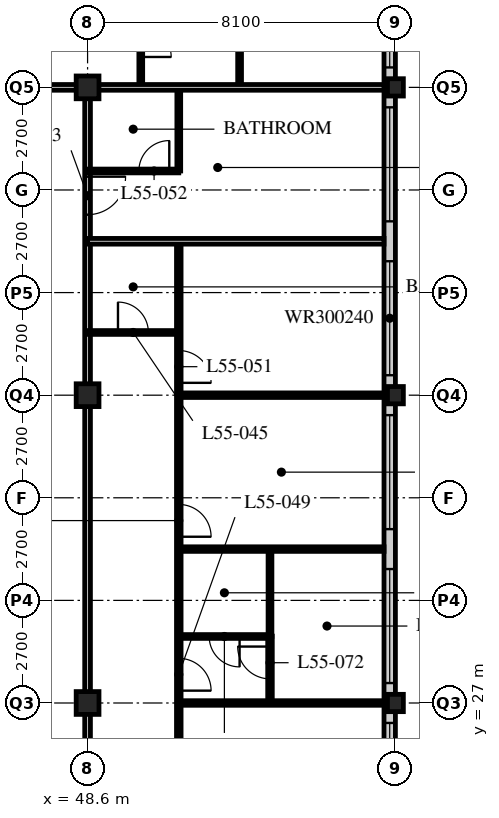
"""IFC4 building model, lengths in metres.
Left out: names, types, materials, properties, quantities, classifications, styles, units other than length and angle.
Written with IfcOpenShell. Run it as: python <this file> out.ifc"""

import sys

from ifc_helpers import new_model, si_unit, direction, frame, frame_2d, origin, origin_2d, place, context, subcontext, project, spatial, rectangle, hollow_rectangle, i_section, extrude, element, fill, save


model = new_model("IFC4")
c1 = context("Model", 3, precision=1e-05, world=origin(), true_north=direction((0.0, 1.0)))
c2 = subcontext(c1, "Body", "Model", "MODEL_VIEW")
j1 = project(units=[si_unit("LENGTHUNIT", "METRE"), si_unit("PLANEANGLEUNIT", "RADIAN")], contexts=[c1])
p1 = place(None, origin())
s1 = spatial("IfcSite", under=j1, at=p1, CompositionType="ELEMENT")
p2 = place(p1, origin())
s2 = spatial("IfcBuilding", under=s1, at=p2, CompositionType="ELEMENT")
p3 = place(p2, frame((0.0, 0.0, 213.6)))
s3 = spatial("IfcBuildingStorey", under=s2, at=p3, CompositionType="ELEMENT", Elevation=213.6)
for number, where, z_axis, x_axis in (
    (1, (48.6, 27.0, 0.0), (0.0, 0.0, 1.0), (1.0, 0.0, 0.0)),
    (2, (48.6, 35.1, 0.0), (0.0, 0.0, 1.0), (1.0, 0.0, 0.0)),
    (3, (48.6, 43.2, 0.0), (0.0, 0.0, 1.0), (1.0, 0.0, 0.0)),
):
    element("IfcColumn", number, at=place(p3, frame(where, z_axis=z_axis, x_axis=x_axis)), inside=s3, PredefinedType="COLUMN", context=c2, shape_type="SweptSolid", body=[
        extrude(hollow_rectangle(XDim=0.6, YDim=0.6, WallThickness=0.05, at=origin_2d()), origin(), (0.0, 0.0, 1.0), 3.6),
    ])
for number, where, z_axis, x_axis in (
    (4, (56.7, 27.0, 0.0), (0.0, 0.0, 1.0), (1.0, 0.0, 0.0)),
    (5, (56.7, 35.1, 0.0), (0.0, 0.0, 1.0), (1.0, 0.0, 0.0)),
    (6, (56.7, 43.2, 0.0), (0.0, 0.0, 1.0), (1.0, 0.0, 0.0)),
):
    element("IfcColumn", number, at=place(p3, frame(where, z_axis=z_axis, x_axis=x_axis)), inside=s3, PredefinedType="COLUMN", context=c2, shape_type="SweptSolid", body=[
        extrude(i_section(OverallWidth=0.418, OverallDepth=0.456, WebThickness=0.042, FlangeThickness=0.067, FilletRadius=0.015, at=origin_2d()), origin(), (0.0, 0.0, 1.0), 3.6),
    ])
p4 = place(p3, frame((56.55, 19.2, 0.0), z_axis=(0.0, 0.0, 1.0), x_axis=(0.0, 1.0, 0.0)))
e7 = element("IfcWall", 7, at=p4, inside=s3, PredefinedType="SOLIDWALL", context=c2, shape_type="SweptSolid", body=[
    extrude(rectangle(XDim=32.1, YDim=0.3, at=frame_2d((16.05, 0.0))), origin(), (0.0, 0.0, 1.0), 3.39),
])
p5 = place(p4, frame((0.225, 0.0, 0.6)))
e8 = element("IfcOpeningElement", 8, at=p5, cuts=e7, PredefinedType="OPENING", context=c2, shape_type="SweptSolid", body=[
    extrude(rectangle(XDim=3.0, YDim=2.4, at=frame_2d((1.5, 1.2))), frame((0.0, 0.16, 0.0), z_axis=(0.0, -1.0, 0.0), x_axis=(1.0, 0.0, 0.0)), (0.0, 0.0, 1.0), 0.32),
])
p6 = place(p4, frame((4.275, 0.0, 0.6)))
e9 = element("IfcOpeningElement", 9, at=p6, cuts=e7, PredefinedType="OPENING", context=c2, shape_type="SweptSolid", body=[
    extrude(rectangle(XDim=3.0, YDim=2.4, at=frame_2d((1.5, 1.2))), frame((0.0, 0.16, 0.0), z_axis=(0.0, -1.0, 0.0), x_axis=(1.0, 0.0, 0.0)), (0.0, 0.0, 1.0), 0.32),
])
p7 = place(p4, frame((8.325, 0.0, 0.6)))
e10 = element("IfcOpeningElement", 10, at=p7, cuts=e7, PredefinedType="OPENING", context=c2, shape_type="SweptSolid", body=[
    extrude(rectangle(XDim=3.0, YDim=2.4, at=frame_2d((1.5, 1.2))), frame((0.0, 0.16, 0.0), z_axis=(0.0, -1.0, 0.0), x_axis=(1.0, 0.0, 0.0)), (0.0, 0.0, 1.0), 0.32),
])
p8 = place(p4, frame((12.375, 0.0, 0.6)))
e11 = element("IfcOpeningElement", 11, at=p8, cuts=e7, PredefinedType="OPENING", context=c2, shape_type="SweptSolid", body=[
    extrude(rectangle(XDim=3.0, YDim=2.4, at=frame_2d((1.5, 1.2))), frame((0.0, 0.16, 0.0), z_axis=(0.0, -1.0, 0.0), x_axis=(1.0, 0.0, 0.0)), (0.0, 0.0, 1.0), 0.32),
])
p9 = place(p4, frame((16.425, 0.0, 0.6)))
e12 = element("IfcOpeningElement", 12, at=p9, cuts=e7, PredefinedType="OPENING", context=c2, shape_type="SweptSolid", body=[
    extrude(rectangle(XDim=3.0, YDim=2.4, at=frame_2d((1.5, 1.2))), frame((0.0, 0.16, 0.0), z_axis=(0.0, -1.0, 0.0), x_axis=(1.0, 0.0, 0.0)), (0.0, 0.0, 1.0), 0.32),
])
p10 = place(p4, frame((20.475, 0.0, 0.6)))
e13 = element("IfcOpeningElement", 13, at=p10, cuts=e7, PredefinedType="OPENING", context=c2, shape_type="SweptSolid", body=[
    extrude(rectangle(XDim=3.0, YDim=2.4, at=frame_2d((1.5, 1.2))), frame((0.0, 0.16, 0.0), z_axis=(0.0, -1.0, 0.0), x_axis=(1.0, 0.0, 0.0)), (0.0, 0.0, 1.0), 0.32),
])
p11 = place(p4, frame((24.525, 0.0, 0.6)))
e14 = element("IfcOpeningElement", 14, at=p11, cuts=e7, PredefinedType="OPENING", context=c2, shape_type="SweptSolid", body=[
    extrude(rectangle(XDim=3.0, YDim=2.4, at=frame_2d((1.5, 1.2))), frame((0.0, 0.16, 0.0), z_axis=(0.0, -1.0, 0.0), x_axis=(1.0, 0.0, 0.0)), (0.0, 0.0, 1.0), 0.32),
])
p12 = place(p4, frame((28.575, 0.0, 0.6)))
e15 = element("IfcOpeningElement", 15, at=p12, cuts=e7, PredefinedType="OPENING", context=c2, shape_type="SweptSolid", body=[
    extrude(rectangle(XDim=3.0, YDim=2.4, at=frame_2d((1.5, 1.2))), frame((0.0, 0.16, 0.0), z_axis=(0.0, -1.0, 0.0), x_axis=(1.0, 0.0, 0.0)), (0.0, 0.0, 1.0), 0.32),
])
p13 = place(p3, frame((12.15, 43.2, 0.0), z_axis=(0.0, 0.0, 1.0), x_axis=(1.0, 0.0, 0.0)))
e16 = element("IfcWall", 16, at=p13, inside=s3, PredefinedType="PARTITIONING", context=c2, shape_type="SweptSolid", body=[
    extrude(rectangle(XDim=36.45, YDim=0.15, at=frame_2d((18.225, 0.0))), origin(), (0.0, 0.0, 1.0), 2.778),
])
p14 = place(p13, frame((4.95, 0.0, 0.0)))
e17 = element("IfcOpeningElement", 17, at=p14, cuts=e16, PredefinedType="OPENING", context=c2, shape_type="SweptSolid", body=[
    extrude(rectangle(XDim=1.0, YDim=2.1, at=frame_2d((0.5, 1.05))), frame((0.0, 0.085, 0.0), z_axis=(0.0, -1.0, 0.0), x_axis=(1.0, 0.0, 0.0)), (0.0, 0.0, 1.0), 0.17),
])
p15 = place(p13, frame((25.0, 0.0, 0.0)))
e18 = element("IfcOpeningElement", 18, at=p15, cuts=e16, PredefinedType="OPENING", context=c2, shape_type="SweptSolid", body=[
    extrude(rectangle(XDim=1.0, YDim=2.1, at=frame_2d((0.5, 1.05))), frame((0.0, 0.085, 0.0), z_axis=(0.0, -1.0, 0.0), x_axis=(1.0, 0.0, 0.0)), (0.0, 0.0, 1.0), 0.17),
])
p16 = place(p13, frame((30.7, 0.0, 0.0)))
e19 = element("IfcOpeningElement", 19, at=p16, cuts=e16, PredefinedType="OPENING", context=c2, shape_type="SweptSolid", body=[
    extrude(rectangle(XDim=1.0, YDim=2.1, at=frame_2d((0.5, 1.05))), frame((0.0, 0.085, 0.0), z_axis=(0.0, -1.0, 0.0), x_axis=(1.0, 0.0, 0.0)), (0.0, 0.0, 1.0), 0.17),
])
p17 = place(p13, frame((33.925, 0.0, 0.0)))
e20 = element("IfcOpeningElement", 20, at=p17, cuts=e16, PredefinedType="OPENING", context=c2, shape_type="SweptSolid", body=[
    extrude(rectangle(XDim=1.0, YDim=2.1, at=frame_2d((0.5, 1.05))), frame((0.0, 0.085, 0.0), z_axis=(0.0, -1.0, 0.0), x_axis=(1.0, 0.0, 0.0)), (0.0, 0.0, 1.0), 0.17),
])
p18 = place(p13, frame((1.525, 0.0, 0.0)))
e21 = element("IfcOpeningElement", 21, at=p18, cuts=e16, PredefinedType="OPENING", context=c2, shape_type="SweptSolid", body=[
    extrude(rectangle(XDim=1.0, YDim=2.1, at=frame_2d((0.5, 1.05))), frame((0.0, 0.085, 0.0), z_axis=(0.0, -1.0, 0.0), x_axis=(1.0, 0.0, 0.0)), (0.0, 0.0, 1.0), 0.17),
])
p19 = place(p3, frame((48.6, 18.9, 0.0), z_axis=(0.0, 0.0, 1.0), x_axis=(0.0, 1.0, 0.0)))
e22 = element("IfcWall", 22, at=p19, inside=s3, PredefinedType="PARTITIONING", context=c2, shape_type="SweptSolid", body=[
    extrude(rectangle(XDim=24.3, YDim=0.15, at=frame_2d((12.15, 0.0))), origin(), (0.0, 0.0, 1.0), 2.778),
])
p20 = place(p19, frame((0.9, 0.0, 0.0)))
e23 = element("IfcOpeningElement", 23, at=p20, cuts=e22, PredefinedType="OPENING", context=c2, shape_type="SweptSolid", body=[
    extrude(rectangle(XDim=1.0, YDim=2.1, at=frame_2d((0.5, 1.05))), frame((0.0, 0.085, 0.0), z_axis=(0.0, -1.0, 0.0), x_axis=(1.0, 0.0, 0.0)), (0.0, 0.0, 1.0), 0.17),
])
p21 = place(p19, frame((20.95, 0.0, 0.0)))
e24 = element("IfcOpeningElement", 24, at=p21, cuts=e22, PredefinedType="OPENING", context=c2, shape_type="SweptSolid", body=[
    extrude(rectangle(XDim=1.0, YDim=2.1, at=frame_2d((0.5, 1.05))), frame((0.0, 0.085, 0.0), z_axis=(0.0, -1.0, 0.0), x_axis=(1.0, 0.0, 0.0)), (0.0, 0.0, 1.0), 0.17),
])
p22 = place(p3, frame((51.0, 18.9, 0.0), z_axis=(0.0, 0.0, 1.0), x_axis=(0.0, 1.0, 0.0)))
e25 = element("IfcWall", 25, at=p22, inside=s3, PredefinedType="PARTITIONING", context=c2, shape_type="SweptSolid", body=[
    extrude(rectangle(XDim=20.25, YDim=0.12, at=frame_2d((10.125, 0.0))), origin(), (0.0, 0.0, 1.0), 3.39),
])
p23 = place(p22, frame((0.975, 0.0, 0.0)))
e26 = element("IfcOpeningElement", 26, at=p23, cuts=e25, PredefinedType="OPENING", context=c2, shape_type="SweptSolid", body=[
    extrude(rectangle(XDim=0.85, YDim=2.1, at=frame_2d((0.425, 1.05))), frame((0.0, 0.07, 0.0), z_axis=(0.0, -1.0, 0.0), x_axis=(1.0, 0.0, 0.0)), (0.0, 0.0, 1.0), 0.14),
])
p24 = place(p22, frame((8.425, 0.0, 0.0)))
e27 = element("IfcOpeningElement", 27, at=p24, cuts=e25, PredefinedType="OPENING", context=c2, shape_type="SweptSolid", body=[
    extrude(rectangle(XDim=0.85, YDim=2.1, at=frame_2d((0.425, 1.05))), frame((0.0, 0.07, 0.0), z_axis=(0.0, -1.0, 0.0), x_axis=(1.0, 0.0, 0.0)), (0.0, 0.0, 1.0), 0.14),
])
p25 = place(p22, frame((12.475, 0.0, 0.0)))
e28 = element("IfcOpeningElement", 28, at=p25, cuts=e25, PredefinedType="OPENING", context=c2, shape_type="SweptSolid", body=[
    extrude(rectangle(XDim=0.85, YDim=2.1, at=frame_2d((0.425, 1.05))), frame((0.0, 0.07, 0.0), z_axis=(0.0, -1.0, 0.0), x_axis=(1.0, 0.0, 0.0)), (0.0, 0.0, 1.0), 0.14),
])
p26 = place(p22, frame((16.525, 0.0, 0.0)))
e29 = element("IfcOpeningElement", 29, at=p26, cuts=e25, PredefinedType="OPENING", context=c2, shape_type="SweptSolid", body=[
    extrude(rectangle(XDim=0.85, YDim=2.1, at=frame_2d((0.425, 1.05))), frame((0.0, 0.07, 0.0), z_axis=(0.0, -1.0, 0.0), x_axis=(1.0, 0.0, 0.0)), (0.0, 0.0, 1.0), 0.14),
])
p27 = place(p3, frame((48.6, 36.75, 0.0), z_axis=(0.0, 0.0, 1.0), x_axis=(1.0, 0.0, 0.0)))
e30 = element("IfcWall", 30, at=p27, inside=s3, PredefinedType="PARTITIONING", context=c2, shape_type="SweptSolid", body=[
    extrude(rectangle(XDim=2.4, YDim=0.1, at=frame_2d((1.2, 0.0))), origin(), (0.0, 0.0, 1.0), 3.39),
])
p28 = place(p27, frame((0.8, 0.0, 0.0)))
e31 = element("IfcOpeningElement", 31, at=p28, cuts=e30, PredefinedType="OPENING", context=c2, shape_type="SweptSolid", body=[
    extrude(rectangle(XDim=0.8, YDim=2.1, at=frame_2d((0.4, 1.05))), frame((0.0, 0.06, 0.0), z_axis=(0.0, -1.0, 0.0), x_axis=(1.0, 0.0, 0.0)), (0.0, 0.0, 1.0), 0.12),
])
p29 = place(p3, frame((51.0, 28.75, 0.0), z_axis=(0.0, 0.0, 1.0), x_axis=(1.0, 0.0, 0.0)))
e32 = element("IfcWall", 32, at=p29, inside=s3, PredefinedType="PARTITIONING", context=c2, shape_type="SweptSolid", body=[
    extrude(rectangle(XDim=2.4, YDim=0.1, at=frame_2d((1.2, 0.0))), origin(), (0.0, 0.0, 1.0), 3.39),
])
p30 = place(p29, frame((0.8, 0.0, 0.0)))
e33 = element("IfcOpeningElement", 33, at=p30, cuts=e32, PredefinedType="OPENING", context=c2, shape_type="SweptSolid", body=[
    extrude(rectangle(XDim=0.8, YDim=2.1, at=frame_2d((0.4, 1.05))), frame((0.0, 0.06, 0.0), z_axis=(0.0, -1.0, 0.0), x_axis=(1.0, 0.0, 0.0)), (0.0, 0.0, 1.0), 0.12),
])
p31 = place(p3, frame((53.4, 28.75, 0.0), z_axis=(0.0, 0.0, 1.0), x_axis=(0.0, 1.0, 0.0)))
e34 = element("IfcWall", 34, at=p31, inside=s3, PredefinedType="PARTITIONING", context=c2, shape_type="SweptSolid", body=[
    extrude(rectangle(XDim=2.3, YDim=0.1, at=frame_2d((1.15, 0.0))), origin(), (0.0, 0.0, 1.0), 3.39),
])
p32 = place(p3, frame((51.0, 27.0, 0.0), z_axis=(0.0, 0.0, 1.0), x_axis=(1.0, 0.0, 0.0)))
e35 = element("IfcWall", 35, at=p32, inside=s3, PredefinedType="PARTITIONING", context=c2, shape_type="SweptSolid", body=[
    extrude(rectangle(XDim=5.4, YDim=0.12, at=frame_2d((2.7, 0.0))), origin(), (0.0, 0.0, 1.0), 2.778),
])
p33 = place(p3, frame((51.0, 31.05, 0.0), z_axis=(0.0, 0.0, 1.0), x_axis=(1.0, 0.0, 0.0)))
e36 = element("IfcWall", 36, at=p33, inside=s3, PredefinedType="PARTITIONING", context=c2, shape_type="SweptSolid", body=[
    extrude(rectangle(XDim=5.4, YDim=0.12, at=frame_2d((2.7, 0.0))), origin(), (0.0, 0.0, 1.0), 3.39),
])
p34 = place(p3, frame((51.0, 35.1, 0.0), z_axis=(0.0, 0.0, 1.0), x_axis=(1.0, 0.0, 0.0)))
e37 = element("IfcWall", 37, at=p34, inside=s3, PredefinedType="PARTITIONING", context=c2, shape_type="SweptSolid", body=[
    extrude(rectangle(XDim=5.4, YDim=0.12, at=frame_2d((2.7, 0.0))), origin(), (0.0, 0.0, 1.0), 2.778),
])
p35 = place(p3, frame((48.6, 39.15, 0.0), z_axis=(0.0, 0.0, 1.0), x_axis=(1.0, 0.0, 0.0)))
e38 = element("IfcWall", 38, at=p35, inside=s3, PredefinedType="PARTITIONING", context=c2, shape_type="SweptSolid", body=[
    extrude(rectangle(XDim=7.8, YDim=0.15, at=frame_2d((3.9, 0.0))), origin(), (0.0, 0.0, 1.0), 3.39),
])
p36 = place(p3, frame((51.0, 41.0, 0.0), z_axis=(0.0, 0.0, 1.0), x_axis=(0.0, 1.0, 0.0)))
e39 = element("IfcWall", 39, at=p36, inside=s3, PredefinedType="PARTITIONING", context=c2, shape_type="SweptSolid", body=[
    extrude(rectangle(XDim=2.2, YDim=0.1, at=frame_2d((1.1, 0.0))), origin(), (0.0, 0.0, 1.0), 3.39),
])
p37 = place(p3, frame((48.6, 41.0, 0.0), z_axis=(0.0, 0.0, 1.0), x_axis=(1.0, 0.0, 0.0)))
e40 = element("IfcWall", 40, at=p37, inside=s3, PredefinedType="PARTITIONING", context=c2, shape_type="SweptSolid", body=[
    extrude(rectangle(XDim=2.4, YDim=0.1, at=frame_2d((1.2, 0.0))), origin(), (0.0, 0.0, 1.0), 3.39),
])
p38 = place(p37, frame((1.35, 0.0, 0.0)))
e41 = element("IfcOpeningElement", 41, at=p38, cuts=e40, PredefinedType="OPENING", context=c2, shape_type="SweptSolid", body=[
    extrude(rectangle(XDim=0.8, YDim=2.1, at=frame_2d((0.4, 1.05))), frame((0.0, 0.06, 0.0), z_axis=(0.0, -1.0, 0.0), x_axis=(1.0, 0.0, 0.0)), (0.0, 0.0, 1.0), 0.12),
])
p39 = place(p3, frame((50.0, 43.2, 0.0), z_axis=(0.0, 0.0, 1.0), x_axis=(0.0, 1.0, 0.0)))
e42 = element("IfcWall", 42, at=p39, inside=s3, PredefinedType="PARTITIONING", context=c2, shape_type="SweptSolid", body=[
    extrude(rectangle(XDim=2.4, YDim=0.1, at=frame_2d((1.2, 0.0))), origin(), (0.0, 0.0, 1.0), 3.39),
])
p40 = place(p39, frame((0.8, 0.0, 0.0)))
e43 = element("IfcOpeningElement", 43, at=p40, cuts=e42, PredefinedType="OPENING", context=c2, shape_type="SweptSolid", body=[
    extrude(rectangle(XDim=0.8, YDim=2.1, at=frame_2d((0.4, 1.05))), frame((0.0, 0.06, 0.0), z_axis=(0.0, -1.0, 0.0), x_axis=(1.0, 0.0, 0.0)), (0.0, 0.0, 1.0), 0.12),
])
p41 = place(p3, frame((52.6, 43.2, 0.0), z_axis=(0.0, 0.0, 1.0), x_axis=(0.0, 1.0, 0.0)))
e44 = element("IfcWall", 44, at=p41, inside=s3, PredefinedType="PARTITIONING", context=c2, shape_type="SweptSolid", body=[
    extrude(rectangle(XDim=2.4, YDim=0.1, at=frame_2d((1.2, 0.0))), origin(), (0.0, 0.0, 1.0), 3.39),
])
p42 = place(p3, frame((48.6, 43.2, 0.0), z_axis=(0.0, 0.0, 1.0), x_axis=(1.0, 0.0, 0.0)))
e45 = element("IfcWall", 45, at=p42, inside=s3, PredefinedType="PARTITIONING", context=c2, shape_type="SweptSolid", body=[
    extrude(rectangle(XDim=7.8, YDim=0.15, at=frame_2d((3.9, 0.0))), origin(), (0.0, 0.0, 1.0), 2.778),
])
p43 = place(p3, frame((53.4, 28.76, 0.0), z_axis=(0.0, 0.0, 1.0), x_axis=(0.0, -1.0, 0.0)))
e46 = element("IfcWall", 46, at=p43, inside=s3, PredefinedType="PARTITIONING", context=c2, shape_type="SweptSolid", body=[
    extrude(rectangle(XDim=1.76, YDim=0.12, at=frame_2d((0.88, 0.0))), origin(), (0.0, 0.0, 1.0), 3.39),
])
p44 = place(p43, frame((0.275, 0.0, 0.0)))
e47 = element("IfcOpeningElement", 47, at=p44, cuts=e46, PredefinedType="OPENING", context=c2, shape_type="SweptSolid", body=[
    extrude(rectangle(XDim=0.85, YDim=2.1, at=frame_2d((0.425, 1.05))), frame((0.0, 0.07, 0.0), z_axis=(0.0, -1.0, 0.0), x_axis=(1.0, 0.0, 0.0)), (0.0, 0.0, 1.0), 0.14),
])
p45 = place(p6, origin())
e48 = element("IfcWindow", 48, at=p45, inside=s3, PartitioningType="SINGLE_PANEL", PredefinedType="WINDOW", context=c2, shape_type="SweptSolid", body=[
    extrude(rectangle(XDim=3.0, YDim=2.4, at=frame_2d((1.5, 1.2))), frame((0.0, 0.03, 0.0), z_axis=(0.0, -1.0, 0.0), x_axis=(1.0, 0.0, 0.0)), (0.0, 0.0, 1.0), 0.06),
])
fill(e9, e48)
p46 = place(p7, origin())
e49 = element("IfcWindow", 49, at=p46, inside=s3, PartitioningType="SINGLE_PANEL", PredefinedType="WINDOW", context=c2, shape_type="SweptSolid", body=[
    extrude(rectangle(XDim=3.0, YDim=2.4, at=frame_2d((1.5, 1.2))), frame((0.0, 0.03, 0.0), z_axis=(0.0, -1.0, 0.0), x_axis=(1.0, 0.0, 0.0)), (0.0, 0.0, 1.0), 0.06),
])
fill(e10, e49)
p47 = place(p8, origin())
e50 = element("IfcWindow", 50, at=p47, inside=s3, PartitioningType="SINGLE_PANEL", PredefinedType="WINDOW", context=c2, shape_type="SweptSolid", body=[
    extrude(rectangle(XDim=3.0, YDim=2.4, at=frame_2d((1.5, 1.2))), frame((0.0, 0.03, 0.0), z_axis=(0.0, -1.0, 0.0), x_axis=(1.0, 0.0, 0.0)), (0.0, 0.0, 1.0), 0.06),
])
fill(e11, e50)
p48 = place(p9, origin())
e51 = element("IfcWindow", 51, at=p48, inside=s3, PartitioningType="SINGLE_PANEL", PredefinedType="WINDOW", context=c2, shape_type="SweptSolid", body=[
    extrude(rectangle(XDim=3.0, YDim=2.4, at=frame_2d((1.5, 1.2))), frame((0.0, 0.03, 0.0), z_axis=(0.0, -1.0, 0.0), x_axis=(1.0, 0.0, 0.0)), (0.0, 0.0, 1.0), 0.06),
])
fill(e12, e51)
p49 = place(p10, origin())
e52 = element("IfcWindow", 52, at=p49, inside=s3, PartitioningType="SINGLE_PANEL", PredefinedType="WINDOW", context=c2, shape_type="SweptSolid", body=[
    extrude(rectangle(XDim=3.0, YDim=2.4, at=frame_2d((1.5, 1.2))), frame((0.0, 0.03, 0.0), z_axis=(0.0, -1.0, 0.0), x_axis=(1.0, 0.0, 0.0)), (0.0, 0.0, 1.0), 0.06),
])
fill(e13, e52)
p50 = place(p11, origin())
e53 = element("IfcWindow", 53, at=p50, inside=s3, PartitioningType="SINGLE_PANEL", PredefinedType="WINDOW", context=c2, shape_type="SweptSolid", body=[
    extrude(rectangle(XDim=3.0, YDim=2.4, at=frame_2d((1.5, 1.2))), frame((0.0, 0.03, 0.0), z_axis=(0.0, -1.0, 0.0), x_axis=(1.0, 0.0, 0.0)), (0.0, 0.0, 1.0), 0.06),
])
fill(e14, e53)
p51 = place(p28, origin())
e54 = element("IfcDoor", 54, at=p51, inside=s3, OperationType="SINGLE_SWING_LEFT", PredefinedType="DOOR", context=c2, shape_type="SweptSolid", body=[
    extrude(rectangle(XDim=0.8, YDim=2.1, at=frame_2d((0.4, 1.05))), frame((0.0, 0.025, 0.0), z_axis=(0.0, -1.0, 0.0), x_axis=(1.0, 0.0, 0.0)), (0.0, 0.0, 1.0), 0.05),
])
fill(e31, e54)
p52 = place(p30, origin())
e55 = element("IfcDoor", 55, at=p52, inside=s3, OperationType="SINGLE_SWING_LEFT", PredefinedType="DOOR", context=c2, shape_type="SweptSolid", body=[
    extrude(rectangle(XDim=0.8, YDim=2.1, at=frame_2d((0.4, 1.05))), frame((0.0, 0.025, 0.0), z_axis=(0.0, -1.0, 0.0), x_axis=(1.0, 0.0, 0.0)), (0.0, 0.0, 1.0), 0.05),
])
fill(e33, e55)
p53 = place(p24, origin())
e56 = element("IfcDoor", 56, at=p53, inside=s3, OperationType="SINGLE_SWING_RIGHT", PredefinedType="DOOR", context=c2, shape_type="SweptSolid", body=[
    extrude(rectangle(XDim=0.85, YDim=2.1, at=frame_2d((0.425, 1.05))), frame((0.0, 0.025, 0.0), z_axis=(0.0, -1.0, 0.0), x_axis=(1.0, 0.0, 0.0)), (0.0, 0.0, 1.0), 0.05),
])
fill(e27, e56)
p54 = place(p25, origin())
e57 = element("IfcDoor", 57, at=p54, inside=s3, OperationType="SINGLE_SWING_RIGHT", PredefinedType="DOOR", context=c2, shape_type="SweptSolid", body=[
    extrude(rectangle(XDim=0.85, YDim=2.1, at=frame_2d((0.425, 1.05))), frame((0.0, 0.025, 0.0), z_axis=(0.0, -1.0, 0.0), x_axis=(1.0, 0.0, 0.0)), (0.0, 0.0, 1.0), 0.05),
])
fill(e28, e57)
p55 = place(p26, origin())
e58 = element("IfcDoor", 58, at=p55, inside=s3, OperationType="SINGLE_SWING_RIGHT", PredefinedType="DOOR", context=c2, shape_type="SweptSolid", body=[
    extrude(rectangle(XDim=0.85, YDim=2.1, at=frame_2d((0.425, 1.05))), frame((0.0, 0.025, 0.0), z_axis=(0.0, -1.0, 0.0), x_axis=(1.0, 0.0, 0.0)), (0.0, 0.0, 1.0), 0.05),
])
fill(e29, e58)
p56 = place(p38, origin())
e59 = element("IfcDoor", 59, at=p56, inside=s3, OperationType="SINGLE_SWING_RIGHT", PredefinedType="DOOR", context=c2, shape_type="SweptSolid", body=[
    extrude(rectangle(XDim=0.8, YDim=2.1, at=frame_2d((0.4, 1.05))), frame((0.0, 0.025, 0.0), z_axis=(0.0, -1.0, 0.0), x_axis=(1.0, 0.0, 0.0)), (0.0, 0.0, 1.0), 0.05),
])
fill(e41, e59)
p57 = place(p21, origin())
e60 = element("IfcDoor", 60, at=p57, inside=s3, OperationType="SINGLE_SWING_LEFT", PredefinedType="DOOR", context=c2, shape_type="SweptSolid", body=[
    extrude(rectangle(XDim=1.0, YDim=2.1, at=frame_2d((0.5, 1.05))), frame((0.0, 0.025, 0.0), z_axis=(0.0, -1.0, 0.0), x_axis=(1.0, 0.0, 0.0)), (0.0, 0.0, 1.0), 0.05),
])
fill(e24, e60)
p58 = place(p40, origin())
e61 = element("IfcDoor", 61, at=p58, inside=s3, OperationType="SINGLE_SWING_RIGHT", PredefinedType="DOOR", context=c2, shape_type="SweptSolid", body=[
    extrude(rectangle(XDim=0.8, YDim=2.1, at=frame_2d((0.4, 1.05))), frame((0.0, 0.025, 0.0), z_axis=(0.0, -1.0, 0.0), x_axis=(1.0, 0.0, 0.0)), (0.0, 0.0, 1.0), 0.05),
])
fill(e43, e61)
p59 = place(p44, origin())
e62 = element("IfcDoor", 62, at=p59, inside=s3, OperationType="SINGLE_SWING_RIGHT", PredefinedType="DOOR", context=c2, shape_type="SweptSolid", body=[
    extrude(rectangle(XDim=0.85, YDim=2.1, at=frame_2d((0.425, 1.05))), frame((0.0, 0.025, 0.0), z_axis=(0.0, -1.0, 0.0), x_axis=(1.0, 0.0, 0.0)), (0.0, 0.0, 1.0), 0.05),
])
fill(e47, e62)
save(model, sys.argv[1])
